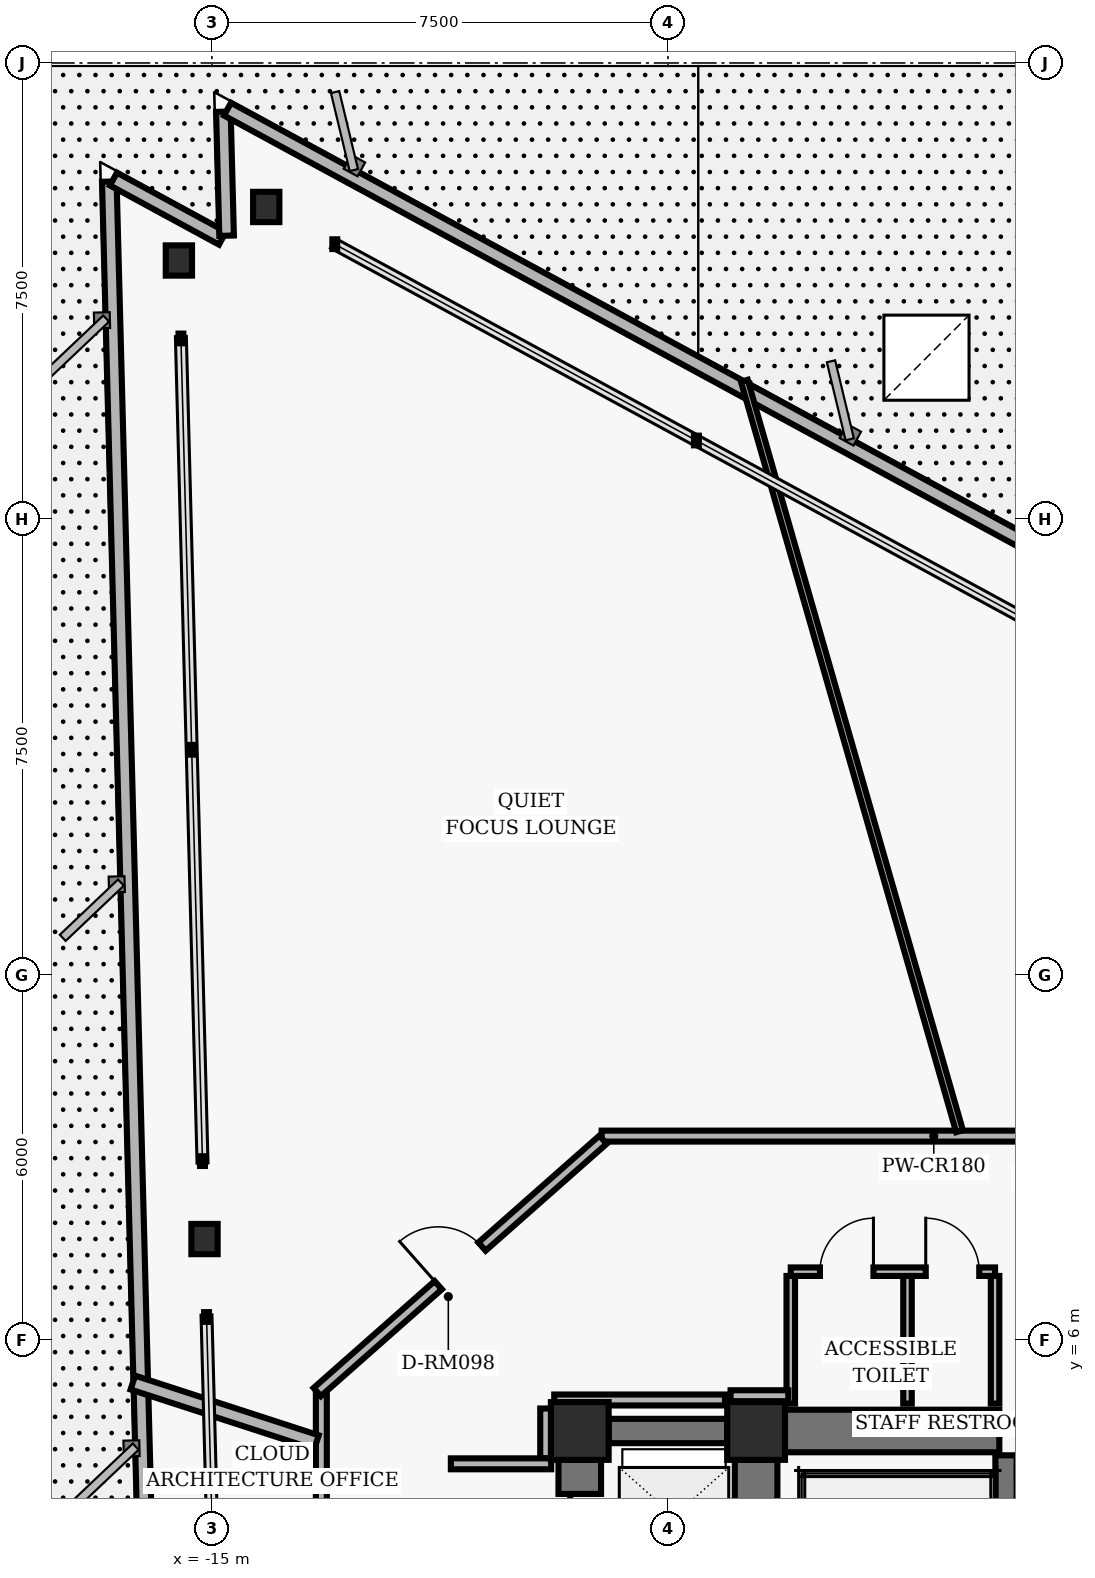
"""IFC4 building model, lengths in metres.
Left out: names, types, materials, properties, quantities, classifications, styles, units other than length and angle.
Written with IfcOpenShell. Run it as: python <this file> out.ifc"""

import sys

from ifc_helpers import new_model, si_unit, direction, frame, frame_2d, origin, origin_2d, place, context, subcontext, project, spatial, rectangle, hollow_rectangle, i_section, extrude, element, fill, save


model = new_model("IFC4")
c1 = context("Model", 3, precision=1e-05, world=origin(), true_north=direction((0.0, 1.0)))
c2 = subcontext(c1, "Body", "Model", "MODEL_VIEW")
j1 = project(units=[si_unit("LENGTHUNIT", "METRE"), si_unit("PLANEANGLEUNIT", "RADIAN")], contexts=[c1])
p1 = place(None, origin())
s1 = spatial("IfcSite", under=j1, at=p1, CompositionType="ELEMENT")
p2 = place(p1, origin())
s2 = spatial("IfcBuilding", under=s1, at=p2, CompositionType="ELEMENT")
p3 = place(p2, frame((0.0, 0.0, 18.88)))
s3 = spatial("IfcBuildingStorey", under=s2, at=p3, CompositionType="ELEMENT", Elevation=18.88)
for number, where, z_axis, x_axis in (
    (1, (-6.05, 4.5, 0.0), (0.0, 0.0, 1.0), (1.0, 0.0, 0.0)),
    (2, (-8.95, 4.5, 0.0), (0.0, 0.0, 1.0), (1.0, 0.0, 0.0)),
):
    element("IfcColumn", number, at=place(p3, frame(where, z_axis=z_axis, x_axis=x_axis)), inside=s3, PredefinedType="COLUMN", context=c2, shape_type="SweptSolid", body=[
        extrude(hollow_rectangle(XDim=0.95, YDim=0.95, WallThickness=0.06, InnerFilletRadius=0.02, OuterFilletRadius=0.04, at=origin_2d()), origin(), (0.0, 0.0, 1.0), 3.36),
    ])
p4 = place(p3, frame((-6.05, 0.475, 0.0), z_axis=(0.0, 0.0, 1.0), x_axis=(0.0, 1.0, 0.0)))
e3 = element("IfcWall", 3, at=p4, inside=s3, PredefinedType="SHEAR", context=c2, shape_type="SweptSolid", body=[
    extrude(rectangle(XDim=3.55, YDim=0.7, at=frame_2d((1.775, 0.0))), origin(), (0.0, 0.0, 1.0), 3.098),
])
p5 = place(p3, frame((-1.94, -4.1, 0.0), z_axis=(0.0, 0.0, 1.0), x_axis=(0.0, 1.0, 0.0)))
e4 = element("IfcWall", 4, at=p5, inside=s3, PredefinedType="SHEAR", context=c2, shape_type="SweptSolid", body=[
    extrude(rectangle(XDim=8.2, YDim=0.35, at=frame_2d((4.1, 0.0))), origin(), (0.0, 0.0, 1.0), 3.098),
])
p6 = place(p3, frame((-5.575, 4.5, 0.0), z_axis=(0.0, 0.0, 1.0), x_axis=(1.0, 0.0, 0.0)))
e5 = element("IfcWall", 5, at=p6, inside=s3, PredefinedType="SHEAR", context=c2, shape_type="SweptSolid", body=[
    extrude(rectangle(XDim=3.525, YDim=0.7, at=frame_2d((1.762, 0.0))), origin(), (0.0, 0.0, 1.0), 3.098),
])
p7 = place(p3, frame((-8.95, -3.825, 0.0), z_axis=(0.0, 0.0, 1.0), x_axis=(0.0, 1.0, 0.0)))
e6 = element("IfcWall", 6, at=p7, inside=s3, PredefinedType="SHEAR", context=c2, shape_type="SweptSolid", body=[
    extrude(rectangle(XDim=7.85, YDim=0.7, at=frame_2d((3.925, 0.0))), origin(), (0.0, 0.0, 1.0), 3.098),
])
p8 = place(p7, frame((0.55, 0.0, 0.0)))
e7 = element("IfcOpeningElement", 7, at=p8, cuts=e6, PredefinedType="OPENING", context=c2, shape_type="SweptSolid", body=[
    extrude(rectangle(XDim=1.06, YDim=2.04, at=frame_2d((0.53, 1.02))), frame((0.0, 0.36, 0.0), z_axis=(0.0, -1.0, 0.0), x_axis=(1.0, 0.0, 0.0)), (0.0, 0.0, 1.0), 0.72),
])
p9 = place(p7, frame((3.395, 0.0, 0.0)))
e8 = element("IfcOpeningElement", 8, at=p9, cuts=e6, PredefinedType="OPENING", context=c2, shape_type="SweptSolid", body=[
    extrude(rectangle(XDim=1.06, YDim=2.04, at=frame_2d((0.53, 1.02))), frame((0.0, 0.36, 0.0), z_axis=(0.0, -1.0, 0.0), x_axis=(1.0, 0.0, 0.0)), (0.0, 0.0, 1.0), 0.72),
])
p10 = place(p7, frame((6.23, 0.0, 0.0)))
e9 = element("IfcOpeningElement", 9, at=p10, cuts=e6, PredefinedType="OPENING", context=c2, shape_type="SweptSolid", body=[
    extrude(rectangle(XDim=1.06, YDim=2.04, at=frame_2d((0.53, 1.02))), frame((0.0, 0.36, 0.0), z_axis=(0.0, -1.0, 0.0), x_axis=(1.0, 0.0, 0.0)), (0.0, 0.0, 1.0), 0.72),
])
p11 = place(p3, frame((-8.475, 4.5, 0.0), z_axis=(0.0, 0.0, 1.0), x_axis=(1.0, 0.0, 0.0)))
e10 = element("IfcWall", 10, at=p11, inside=s3, PredefinedType="SHEAR", context=c2, shape_type="SweptSolid", body=[
    extrude(rectangle(XDim=1.95, YDim=0.4, at=frame_2d((0.975, 0.0))), origin(), (0.0, 0.0, 1.0), 3.098),
])
for number, where, z_axis, x_axis in (
    (11, (-14.106, 24.632, 0.0), (0.0, 0.0, 1.0), (1.0, 0.0, 0.0)),
    (12, (-15.543, 23.751, 0.0), (0.0, 0.0, 1.0), (1.0, 0.0, 0.0)),
    (13, (-15.121, 7.657, 0.0), (0.0, 0.0, 1.0), (1.0, 0.0, 0.0)),
):
    element("IfcColumn", number, at=place(p3, frame(where, z_axis=z_axis, x_axis=x_axis)), inside=s3, PredefinedType="COLUMN", context=c2, shape_type="SweptSolid", body=[
        extrude(i_section(OverallWidth=0.432, OverallDepth=0.498, WebThickness=0.056, FlangeThickness=0.089, FilletRadius=0.025, at=origin_2d()), origin(), (0.0, 0.0, 1.0), 3.36),
    ])
p12 = place(p3, frame((-15.354, -25.888, 0.0), z_axis=(0.0, 0.0, 1.0), x_axis=(-0.026174886222, 0.999657378971, 0.0)))
e14 = element("IfcWall", 14, at=p12, inside=s3, PredefinedType="PARAPET", context=c2, shape_type="SweptSolid", body=[
    extrude(rectangle(XDim=50.955, YDim=0.24, at=frame_2d((25.478, 0.0))), origin(), (0.0, 0.0, 1.0), 1.65),
])
for number, where, z_axis, x_axis in (
    (15, (-16.619, 25.091, 0.0), (0.0, 0.0, 1.0), (0.879, -0.477, 0.0)),
    (16, (-14.758, 24.159, 0.0), (0.0, 0.0, 1.0), (-0.026, 1.0, 0.0)),
):
    element("IfcWall", number, at=place(p3, frame(where, z_axis=z_axis, x_axis=x_axis)), inside=s3, PredefinedType="PARAPET", context=c2, shape_type="SweptSolid", body=[
        extrude(rectangle(XDim=2.04, YDim=0.24, at=frame_2d((1.02, 0.0))), origin(), (0.0, 0.0, 1.0), 1.65),
    ])
p13 = place(p3, frame((-14.743, 26.24, 0.0), z_axis=(0.0, 0.0, 1.0), x_axis=(0.878817850286, -0.477157401722, 0.0)))
e17 = element("IfcWall", 17, at=p13, inside=s3, PredefinedType="PARAPET", context=c2, shape_type="SweptSolid", body=[
    extrude(rectangle(XDim=22.278, YDim=0.24, at=frame_2d((11.139, 0.0))), origin(), (0.0, 0.0, 1.0), 1.65),
])
for number, where, z_axis, x_axis in (
    (18, (-5.48, 4.95, 0.0), (0.0, 0.0, 1.0), (0.0, 1.0, 0.0)),
    (19, (-3.56, 4.95, 0.0), (0.0, 0.0, 1.0), (0.0, 1.0, 0.0)),
    (20, (-2.12, 4.95, 0.0), (0.0, 0.0, 1.0), (0.0, 1.0, 0.0)),
):
    element("IfcWall", number, at=place(p3, frame(where, z_axis=z_axis, x_axis=x_axis)), inside=s3, PredefinedType="PARTITIONING", context=c2, shape_type="SweptSolid", body=[
        extrude(rectangle(XDim=2.1, YDim=0.14, at=frame_2d((1.05, 0.0))), origin(), (0.0, 0.0, 1.0), 3.073),
    ])
p14 = place(p3, frame((-5.48, 7.12, 0.0), z_axis=(0.0, 0.0, 1.0), x_axis=(1.0, 0.0, 0.0)))
e21 = element("IfcWall", 21, at=p14, inside=s3, PredefinedType="PARTITIONING", context=c2, shape_type="SweptSolid", body=[
    extrude(rectangle(XDim=3.36, YDim=0.14, at=frame_2d((1.68, 0.0))), origin(), (0.0, 0.0, 1.0), 3.073),
])
p15 = place(p14, frame((0.48, 0.0, 0.0)))
e22 = element("IfcOpeningElement", 22, at=p15, cuts=e21, PredefinedType="OPENING", context=c2, shape_type="SweptSolid", body=[
    extrude(rectangle(XDim=0.88, YDim=2.02, at=frame_2d((0.44, 1.01))), frame((0.0, 0.08, 0.0), z_axis=(0.0, -1.0, 0.0), x_axis=(1.0, 0.0, 0.0)), (0.0, 0.0, 1.0), 0.16),
])
p16 = place(p14, frame((2.22, 0.0, 0.0)))
e23 = element("IfcOpeningElement", 23, at=p16, cuts=e21, PredefinedType="OPENING", context=c2, shape_type="SweptSolid", body=[
    extrude(rectangle(XDim=0.88, YDim=2.02, at=frame_2d((0.44, 1.01))), frame((0.0, 0.08, 0.0), z_axis=(0.0, -1.0, 0.0), x_axis=(1.0, 0.0, 0.0)), (0.0, 0.0, 1.0), 0.16),
])
p17 = place(p3, frame((-8.59, 9.35, 0.0), z_axis=(0.0, 0.0, 1.0), x_axis=(1.0, 0.0, 0.0)))
e24 = element("IfcWall", 24, at=p17, inside=s3, PredefinedType="PARTITIONING", context=c2, shape_type="SweptSolid", body=[
    extrude(rectangle(XDim=17.18, YDim=0.18, at=frame_2d((8.59, 0.0))), origin(), (0.0, 0.0, 1.0), 2.587),
])
p18 = place(p17, frame((10.924, 0.0, 0.0)))
e25 = element("IfcOpeningElement", 25, at=p18, cuts=e24, PredefinedType="OPENING", context=c2, shape_type="SweptSolid", body=[
    extrude(rectangle(XDim=0.96, YDim=2.02, at=frame_2d((0.48, 1.01))), frame((0.0, 0.1, 0.0), z_axis=(0.0, -1.0, 0.0), x_axis=(1.0, 0.0, 0.0)), (0.0, 0.0, 1.0), 0.2),
])
p19 = place(p3, frame((-13.2, -5.11, 0.0), z_axis=(0.0, 0.0, 1.0), x_axis=(0.0, 1.0, 0.0)))
e26 = element("IfcWall", 26, at=p19, inside=s3, PredefinedType="PARTITIONING", context=c2, shape_type="SweptSolid", body=[
    extrude(rectangle(XDim=10.22, YDim=0.18, at=frame_2d((5.11, 0.0))), origin(), (0.0, 0.0, 1.0), 2.587),
])
p20 = place(p19, frame((4.361, 0.0, 0.0)))
e27 = element("IfcOpeningElement", 27, at=p20, cuts=e26, PredefinedType="OPENING", context=c2, shape_type="SweptSolid", body=[
    extrude(rectangle(XDim=0.96, YDim=2.02, at=frame_2d((0.48, 1.01))), frame((0.0, 0.1, 0.0), z_axis=(0.0, -1.0, 0.0), x_axis=(1.0, 0.0, 0.0)), (0.0, 0.0, 1.0), 0.2),
])
p21 = place(p3, frame((-13.268, 5.14, 0.0), z_axis=(0.0, 0.0, 1.0), x_axis=(0.749626463267, 0.66186113768, 0.0)))
e28 = element("IfcWall", 28, at=p21, inside=s3, PredefinedType="PARTITIONING", context=c2, shape_type="SweptSolid", body=[
    extrude(rectangle(XDim=6.27, YDim=0.18, at=frame_2d((3.135, 0.0))), origin(), (0.0, 0.0, 1.0), 3.073),
])
p22 = place(p21, frame((2.655, 0.0, 0.0)))
e29 = element("IfcOpeningElement", 29, at=p22, cuts=e28, PredefinedType="OPENING", context=c2, shape_type="SweptSolid", body=[
    extrude(rectangle(XDim=0.96, YDim=2.02, at=frame_2d((0.48, 1.01))), frame((0.0, 0.1, 0.0), z_axis=(0.0, -1.0, 0.0), x_axis=(1.0, 0.0, 0.0)), (0.0, 0.0, 1.0), 0.2),
])
p23 = place(p3, frame((-9.51, 4.87, 0.0), z_axis=(0.0, 0.0, 1.0), x_axis=(0.0, -1.0, 0.0)))
e30 = element("IfcWall", 30, at=p23, inside=s3, PredefinedType="PARTITIONING", context=c2, shape_type="SweptSolid", body=[
    extrude(rectangle(XDim=0.82, YDim=0.18, at=frame_2d((0.41, 0.0))), origin(), (0.0, 0.0, 1.0), 3.073),
])
p24 = place(p3, frame((-9.42, 3.96, 0.0), z_axis=(0.0, 0.0, 1.0), x_axis=(-1.0, 0.0, 0.0)))
e31 = element("IfcWall", 31, at=p24, inside=s3, PredefinedType="PARTITIONING", context=c2, shape_type="SweptSolid", body=[
    extrude(rectangle(XDim=1.65, YDim=0.18, at=frame_2d((0.825, 0.0))), origin(), (0.0, 0.0, 1.0), 3.073),
])
p25 = place(p3, frame((-5.52, 5.08, 0.0), z_axis=(0.0, 0.0, 1.0), x_axis=(-1.0, 0.0, 0.0)))
e32 = element("IfcWall", 32, at=p25, inside=s3, PredefinedType="PARTITIONING", context=c2, shape_type="SweptSolid", body=[
    extrude(rectangle(XDim=0.95, YDim=0.18, at=frame_2d((0.475, 0.0))), origin(), (0.0, 0.0, 1.0), 3.073),
])
p26 = place(p3, frame((-6.562, 5.01, 0.0), z_axis=(0.0, 0.0, 1.0), x_axis=(-1.0, 0.0, 0.0)))
e33 = element("IfcWall", 33, at=p26, inside=s3, PredefinedType="PARTITIONING", context=c2, shape_type="SweptSolid", body=[
    extrude(rectangle(XDim=2.808, YDim=0.18, at=frame_2d((1.404, 0.0))), origin(), (0.0, 0.0, 1.0), 3.073),
])
p27 = place(p3, frame((-2.704, 9.43, 0.0), z_axis=(0.0, 0.0, 1.0), x_axis=(-0.275627518328, 0.961264516738, 0.0)))
e34 = element("IfcWall", 34, at=p27, inside=s3, PredefinedType="MOVABLE", context=c2, shape_type="SweptSolid", body=[
    extrude(rectangle(XDim=12.841, YDim=0.115, at=frame_2d((6.42, 0.0))), origin(), (0.0, 0.0, 1.0), 3.073),
])
p28 = place(p3, frame((-13.28, 4.315, 0.0), z_axis=(0.0, 0.0, 1.0), x_axis=(-0.951062315171, 0.3089991467, 0.0)))
e35 = element("IfcWall", 35, at=p28, inside=s3, PredefinedType="PARTITIONING", context=c2, shape_type="SweptSolid", body=[
    extrude(rectangle(XDim=3.176, YDim=0.24, at=frame_2d((1.588, 0.0))), origin(), (0.0, 0.0, 1.0), 3.073),
])
p29 = place(p3, frame((0.0, 0.0, -0.23)))
p30 = place(p29, frame((-3.248, 22.153, 0.0)))
p31 = place(p30, frame((0.0, 0.0, 0.18)))
e36 = element("IfcWindow", 36, at=p31, inside=s3, PartitioningType="SINGLE_PANEL", PredefinedType="SKYLIGHT", context=c2, shape_type="SweptSolid", body=[
    extrude(rectangle(XDim=1.4, YDim=1.4, at=origin_2d()), origin(), (0.0, 0.0, 1.0), 0.05),
])
p32 = place(p15, origin())
e37 = element("IfcDoor", 37, at=p32, inside=s3, OperationType="SINGLE_SWING_RIGHT", PredefinedType="DOOR", context=c2, shape_type="SweptSolid", body=[
    extrude(rectangle(XDim=0.88, YDim=2.02, at=frame_2d((0.44, 1.01))), frame((0.0, 0.025, 0.0), z_axis=(0.0, -1.0, 0.0), x_axis=(1.0, 0.0, 0.0)), (0.0, 0.0, 1.0), 0.05),
])
fill(e22, e37)
p33 = place(p16, origin())
e38 = element("IfcDoor", 38, at=p33, inside=s3, OperationType="SINGLE_SWING_LEFT", PredefinedType="DOOR", context=c2, shape_type="SweptSolid", body=[
    extrude(rectangle(XDim=0.88, YDim=2.02, at=frame_2d((0.44, 1.01))), frame((0.0, 0.025, 0.0), z_axis=(0.0, -1.0, 0.0), x_axis=(1.0, 0.0, 0.0)), (0.0, 0.0, 1.0), 0.05),
])
fill(e23, e38)
p34 = place(p10, origin())
e39 = element("IfcDoor", 39, at=p34, inside=s3, OperationType="SLIDING_TO_LEFT", PredefinedType="DOOR", context=c2, shape_type="SweptSolid", body=[
    extrude(rectangle(XDim=1.06, YDim=2.04, at=frame_2d((0.53, 1.02))), frame((0.0, 0.025, 0.0), z_axis=(0.0, -1.0, 0.0), x_axis=(1.0, 0.0, 0.0)), (0.0, 0.0, 1.0), 0.05),
])
fill(e9, e39)
p35 = place(p22, origin())
e40 = element("IfcDoor", 40, at=p35, inside=s3, OperationType="SINGLE_SWING_LEFT", PredefinedType="DOOR", context=c2, shape_type="SweptSolid", body=[
    extrude(rectangle(XDim=0.96, YDim=2.02, at=frame_2d((0.48, 1.01))), frame((0.0, 0.025, 0.0), z_axis=(0.0, -1.0, 0.0), x_axis=(1.0, 0.0, 0.0)), (0.0, 0.0, 1.0), 0.05),
])
fill(e29, e40)
save(model, sys.argv[1])
